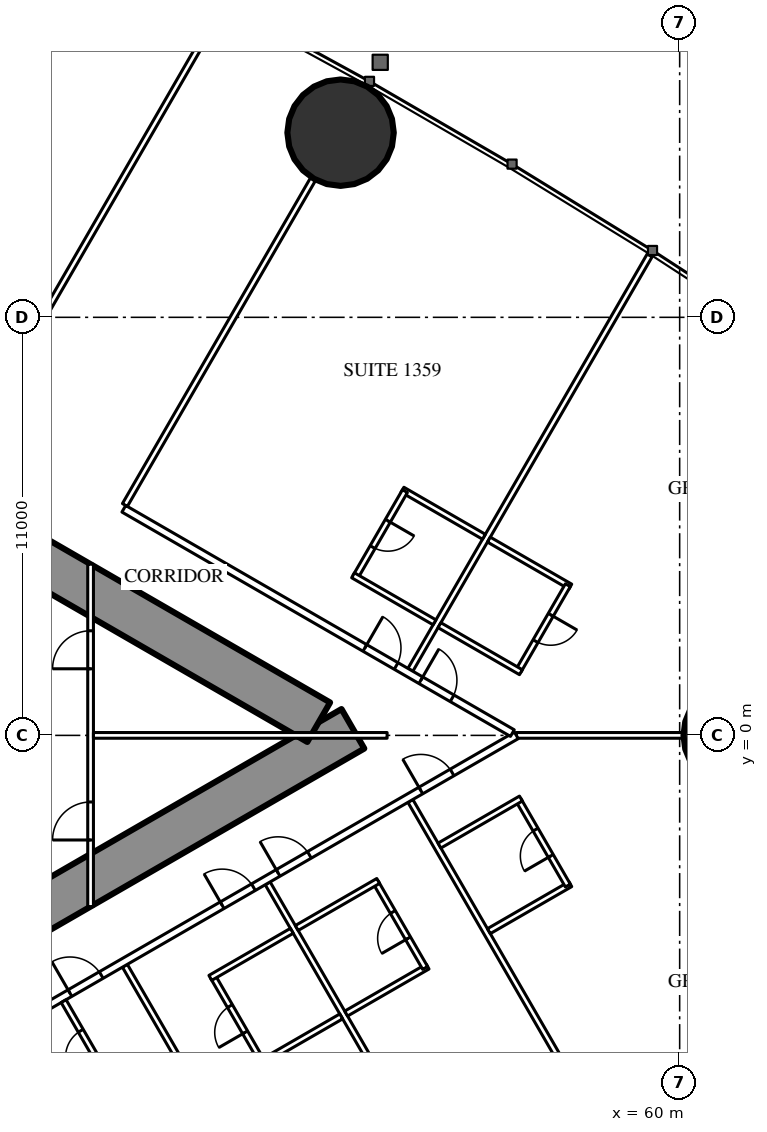
"""IFC4 building model, lengths in metres.
Left out: names, types, materials, properties, quantities, classifications, styles, units other than length and angle.
Written with IfcOpenShell. Run it as: python <this file> out.ifc"""

import sys

from ifc_helpers import new_model, si_unit, direction, frame, frame_2d, origin, origin_2d, place, context, subcontext, project, spatial, rectangle, hollow_circle, extrude, element, fill, save


model = new_model("IFC4")
c1 = context("Model", 3, precision=1e-05, world=origin(), true_north=direction((0.0, 1.0)))
c2 = subcontext(c1, "Body", "Model", "MODEL_VIEW")
j1 = project(units=[si_unit("LENGTHUNIT", "METRE"), si_unit("PLANEANGLEUNIT", "RADIAN")], contexts=[c1])
p1 = place(None, origin())
s1 = spatial("IfcSite", under=j1, at=p1, CompositionType="ELEMENT")
p2 = place(p1, origin())
s2 = spatial("IfcBuilding", under=s1, at=p2, CompositionType="ELEMENT")
p3 = place(p2, frame((0.0, 0.0, 53.0)))
s3 = spatial("IfcBuildingStorey", under=s2, at=p3, CompositionType="ELEMENT", Elevation=53.0)
p4 = place(p3, frame((51.078, 15.858, 0.0), z_axis=(0.0, 0.0, 1.0), x_axis=(1.0, 0.0, 0.0)))
e1 = element("IfcColumn", 1, at=p4, inside=s3, PredefinedType="COLUMN", context=c2, shape_type="SweptSolid", body=[
    extrude(hollow_circle(Radius=1.4, WallThickness=0.12, at=origin_2d()), origin(), (0.0, 0.0, 1.0), 3.5),
])
p5 = place(p3, frame((61.5, 0.0, 0.0), z_axis=(0.0, 0.0, 1.0), x_axis=(1.0, 0.0, 0.0)))
e2 = element("IfcColumn", 2, at=p5, inside=s3, PredefinedType="COLUMN", context=c2, shape_type="SweptSolid", body=[
    extrude(hollow_circle(Radius=1.4, WallThickness=0.1, at=origin_2d()), origin(), (0.0, 0.0, 1.0), 3.5),
])
p6 = place(p3, frame((27.2, -13.8, 0.0), z_axis=(0.0, 0.0, 1.0), x_axis=(0.866027159892, 0.499996958321, 0.0)))
e3 = element("IfcWall", 3, at=p6, inside=s3, PredefinedType="SHEAR", context=c2, shape_type="SweptSolid", body=[
    extrude(rectangle(XDim=27.947, YDim=1.2, at=frame_2d((13.973, 0.0))), origin(), (0.0, 0.0, 1.0), 3.5),
])
p7 = place(p6, frame((4.6, 0.0, 0.0)))
e4 = element("IfcOpeningElement", 4, at=p7, cuts=e3, PredefinedType="OPENING", context=c2, shape_type="SweptSolid", body=[
    extrude(rectangle(XDim=1.0, YDim=2.2, at=frame_2d((0.5, 1.1))), frame((0.0, 0.61, 0.0), z_axis=(0.0, -1.0, 0.0), x_axis=(1.0, 0.0, 0.0)), (0.0, 0.0, 1.0), 1.22),
])
p8 = place(p6, frame((13.395, 0.0, 0.0)))
e5 = element("IfcOpeningElement", 5, at=p8, cuts=e3, PredefinedType="OPENING", context=c2, shape_type="SweptSolid", body=[
    extrude(rectangle(XDim=1.8, YDim=2.2, at=frame_2d((0.9, 1.1))), frame((0.0, 0.61, 0.0), z_axis=(0.0, -1.0, 0.0), x_axis=(1.0, 0.0, 0.0)), (0.0, 0.0, 1.0), 1.22),
])
p9 = place(p3, frame((27.2, 13.8, 0.0), z_axis=(0.0, 0.0, 1.0), x_axis=(0.866024515034, -0.500001539357, 0.0)))
e6 = element("IfcWall", 6, at=p9, inside=s3, PredefinedType="SHEAR", context=c2, shape_type="SweptSolid", body=[
    extrude(rectangle(XDim=26.907, YDim=1.2, at=frame_2d((13.454, 0.0))), origin(), (0.0, 0.0, 1.0), 3.5),
])
p10 = place(p9, frame((4.6, 0.0, 0.0)))
e7 = element("IfcOpeningElement", 7, at=p10, cuts=e6, PredefinedType="OPENING", context=c2, shape_type="SweptSolid", body=[
    extrude(rectangle(XDim=1.0, YDim=2.2, at=frame_2d((0.5, 1.1))), frame((0.0, 0.61, 0.0), z_axis=(0.0, -1.0, 0.0), x_axis=(1.0, 0.0, 0.0)), (0.0, 0.0, 1.0), 1.22),
])
p11 = place(p9, frame((13.395, 0.0, 0.0)))
e8 = element("IfcOpeningElement", 8, at=p11, cuts=e6, PredefinedType="OPENING", context=c2, shape_type="SweptSolid", body=[
    extrude(rectangle(XDim=1.8, YDim=2.2, at=frame_2d((0.9, 1.1))), frame((0.0, 0.61, 0.0), z_axis=(0.0, -1.0, 0.0), x_axis=(1.0, 0.0, 0.0)), (0.0, 0.0, 1.0), 1.22),
])
p12 = place(p3, frame((41.647, -8.23, 0.0), z_axis=(0.0, 0.0, 1.0), x_axis=(0.49998590462, -0.866033541603, 0.0)))
e9 = element("IfcWall", 9, at=p12, inside=s3, PredefinedType="PARTITIONING", context=c2, shape_type="SweptSolid", body=[
    extrude(rectangle(XDim=12.621, YDim=0.15, at=frame_2d((6.311, 0.0))), origin(), (0.0, 0.0, 1.0), 3.25),
])
p13 = place(p3, frame((45.403, -6.062, 0.0), z_axis=(0.0, 0.0, 1.0), x_axis=(0.500007077968, -0.866021317279, 0.0)))
e10 = element("IfcWall", 10, at=p13, inside=s3, PredefinedType="PARTITIONING", context=c2, shape_type="SweptSolid", body=[
    extrude(rectangle(XDim=12.721, YDim=0.15, at=frame_2d((6.361, 0.0))), origin(), (0.0, 0.0, 1.0), 3.25),
])
p14 = place(p3, frame((49.159, -3.893, 0.0), z_axis=(0.0, 0.0, 1.0), x_axis=(0.499998773722, -0.866026111775, 0.0)))
e11 = element("IfcWall", 11, at=p14, inside=s3, PredefinedType="PARTITIONING", context=c2, shape_type="SweptSolid", body=[
    extrude(rectangle(XDim=9.892, YDim=0.15, at=frame_2d((4.946, 0.0))), origin(), (0.0, 0.0, 1.0), 2.25),
])
p15 = place(p3, frame((52.915, -1.725, 0.0), z_axis=(0.0, 0.0, 1.0), x_axis=(0.499997163113, -0.866027041656, 0.0)))
e12 = element("IfcWall", 12, at=p15, inside=s3, PredefinedType="PARTITIONING", context=c2, shape_type="SweptSolid", body=[
    extrude(rectangle(XDim=12.591, YDim=0.15, at=frame_2d((6.295, 0.0))), origin(), (0.0, 0.0, 1.0), 3.25),
])
p16 = place(p3, frame((41.647, 8.23, 0.0), z_axis=(0.0, 0.0, 1.0), x_axis=(0.49998590462, 0.866033541603, 0.0)))
e13 = element("IfcWall", 13, at=p16, inside=s3, PredefinedType="PARTITIONING", context=c2, shape_type="SweptSolid", body=[
    extrude(rectangle(XDim=12.621, YDim=0.15, at=frame_2d((6.311, 0.0))), origin(), (0.0, 0.0, 1.0), 3.25),
])
p17 = place(p3, frame((45.403, 6.062, 0.0), z_axis=(0.0, 0.0, 1.0), x_axis=(0.500013434677, 0.866017647131, 0.0)))
e14 = element("IfcWall", 14, at=p17, inside=s3, PredefinedType="PARTITIONING", context=c2, shape_type="SweptSolid", body=[
    extrude(rectangle(XDim=9.902, YDim=0.15, at=frame_2d((4.951, 0.0))), origin(), (0.0, 0.0, 1.0), 2.25),
])
p18 = place(p3, frame((52.915, 1.725, 0.0), z_axis=(0.0, 0.0, 1.0), x_axis=(0.499997163113, 0.866027041656, 0.0)))
e15 = element("IfcWall", 15, at=p18, inside=s3, PredefinedType="PARTITIONING", context=c2, shape_type="SweptSolid", body=[
    extrude(rectangle(XDim=12.591, YDim=0.15, at=frame_2d((6.295, 0.0))), origin(), (0.0, 0.0, 1.0), 3.25),
])
p19 = place(p3, frame((55.702, 0.0, 0.0), z_axis=(0.0, 0.0, 1.0), x_axis=(1.0, 0.0, 0.0)))
e16 = element("IfcWall", 16, at=p19, inside=s3, PredefinedType="PARTITIONING", context=c2, shape_type="SweptSolid", body=[
    extrude(rectangle(XDim=16.117, YDim=0.15, at=frame_2d((8.059, 0.0))), origin(), (0.0, 0.0, 1.0), 2.25),
])
p20 = place(p3, frame((37.96, -10.243, 0.0), z_axis=(0.0, 0.0, 1.0), x_axis=(0.866026429433, 0.499998223521, 0.0)))
e17 = element("IfcWall", 17, at=p20, inside=s3, PredefinedType="PARTITIONING", context=c2, shape_type="SweptSolid", body=[
    extrude(rectangle(XDim=20.487, YDim=0.2, at=frame_2d((10.243, 0.0))), origin(), (0.0, 0.0, 1.0), 3.25),
])
p21 = place(p20, frame((6.925, 0.0, 0.0)))
e18 = element("IfcOpeningElement", 18, at=p21, cuts=e17, PredefinedType="OPENING", context=c2, shape_type="SweptSolid", body=[
    extrude(rectangle(XDim=0.95, YDim=2.2, at=frame_2d((0.475, 1.1))), frame((0.0, 0.11, 0.0), z_axis=(0.0, -1.0, 0.0), x_axis=(1.0, 0.0, 0.0)), (0.0, 0.0, 1.0), 0.22),
])
p22 = place(p20, frame((11.549, 0.0, 0.0)))
e19 = element("IfcOpeningElement", 19, at=p22, cuts=e17, PredefinedType="OPENING", context=c2, shape_type="SweptSolid", body=[
    extrude(rectangle(XDim=0.95, YDim=2.2, at=frame_2d((0.475, 1.1))), frame((0.0, 0.11, 0.0), z_axis=(0.0, -1.0, 0.0), x_axis=(1.0, 0.0, 0.0)), (0.0, 0.0, 1.0), 0.22),
])
p23 = place(p20, frame((13.249, 0.0, 0.0)))
e20 = element("IfcOpeningElement", 20, at=p23, cuts=e17, PredefinedType="OPENING", context=c2, shape_type="SweptSolid", body=[
    extrude(rectangle(XDim=0.95, YDim=2.2, at=frame_2d((0.475, 1.1))), frame((0.0, 0.11, 0.0), z_axis=(0.0, -1.0, 0.0), x_axis=(1.0, 0.0, 0.0)), (0.0, 0.0, 1.0), 0.22),
])
p24 = place(p20, frame((17.585, 0.0, 0.0)))
e21 = element("IfcOpeningElement", 21, at=p24, cuts=e17, PredefinedType="OPENING", context=c2, shape_type="SweptSolid", body=[
    extrude(rectangle(XDim=0.95, YDim=2.2, at=frame_2d((0.475, 1.1))), frame((0.0, 0.11, 0.0), z_axis=(0.0, -1.0, 0.0), x_axis=(1.0, 0.0, 0.0)), (0.0, 0.0, 1.0), 0.22),
])
p25 = place(p20, frame((0.6, 0.0, 0.0)))
e22 = element("IfcOpeningElement", 22, at=p25, cuts=e17, PredefinedType="OPENING", context=c2, shape_type="SweptSolid", body=[
    extrude(rectangle(XDim=0.95, YDim=2.2, at=frame_2d((0.475, 1.1))), frame((0.0, 0.11, 0.0), z_axis=(0.0, -1.0, 0.0), x_axis=(1.0, 0.0, 0.0)), (0.0, 0.0, 1.0), 0.22),
])
p26 = place(p3, frame((45.375, 5.963, 0.0), z_axis=(0.0, 0.0, 1.0), x_axis=(0.86603164725, -0.499989185844, 0.0)))
e23 = element("IfcWall", 23, at=p26, inside=s3, PredefinedType="PARTITIONING", context=c2, shape_type="SweptSolid", body=[
    extrude(rectangle(XDim=11.805, YDim=0.2, at=frame_2d((5.903, 0.0))), origin(), (0.0, 0.0, 1.0), 3.25),
])
p27 = place(p26, frame((9.024, 0.0, 0.0)))
e24 = element("IfcOpeningElement", 24, at=p27, cuts=e23, PredefinedType="OPENING", context=c2, shape_type="SweptSolid", body=[
    extrude(rectangle(XDim=0.95, YDim=2.2, at=frame_2d((0.475, 1.1))), frame((0.0, 0.11, 0.0), z_axis=(0.0, -1.0, 0.0), x_axis=(1.0, 0.0, 0.0)), (0.0, 0.0, 1.0), 0.22),
])
p28 = place(p26, frame((7.324, 0.0, 0.0)))
e25 = element("IfcOpeningElement", 25, at=p28, cuts=e23, PredefinedType="OPENING", context=c2, shape_type="SweptSolid", body=[
    extrude(rectangle(XDim=0.95, YDim=2.2, at=frame_2d((0.475, 1.1))), frame((0.0, 0.11, 0.0), z_axis=(0.0, -1.0, 0.0), x_axis=(1.0, 0.0, 0.0)), (0.0, 0.0, 1.0), 0.22),
])
p29 = place(p3, frame((43.791, -6.993, 0.0), z_axis=(0.0, 0.0, 1.0), x_axis=(0.500047596559, -0.865997922154, 0.0)))
e26 = element("IfcWall", 26, at=p29, inside=s3, PredefinedType="PARTITIONING", context=c2, shape_type="SweptSolid", body=[
    extrude(rectangle(XDim=2.6, YDim=0.15, at=frame_2d((1.3, 0.0))), origin(), (0.0, 0.0, 1.0), 3.25),
])
p30 = place(p29, frame((0.9, 0.0, 0.0)))
e27 = element("IfcOpeningElement", 27, at=p30, cuts=e26, PredefinedType="OPENING", context=c2, shape_type="SweptSolid", body=[
    extrude(rectangle(XDim=0.8, YDim=2.2, at=frame_2d((0.4, 1.1))), frame((0.0, 0.085, 0.0), z_axis=(0.0, -1.0, 0.0), x_axis=(1.0, 0.0, 0.0)), (0.0, 0.0, 1.0), 0.17),
])
p31 = place(p3, frame((48.951, -8.632, 0.0), z_axis=(0.0, 0.0, 1.0), x_axis=(0.866006523861, 0.500032699561, 0.0)))
e28 = element("IfcWall", 28, at=p31, inside=s3, PredefinedType="PARTITIONING", context=c2, shape_type="SweptSolid", body=[
    extrude(rectangle(XDim=2.475, YDim=0.15, at=frame_2d((1.237, 0.0))), origin(), (0.0, 0.0, 1.0), 3.25),
])
p32 = place(p3, frame((47.716, -6.343, 0.0), z_axis=(0.0, 0.0, 1.0), x_axis=(0.500006934395, -0.866021400173, 0.0)))
e29 = element("IfcWall", 29, at=p32, inside=s3, PredefinedType="PARTITIONING", context=c2, shape_type="SweptSolid", body=[
    extrude(rectangle(XDim=2.6, YDim=0.15, at=frame_2d((1.3, 0.0))), origin(), (0.0, 0.0, 1.0), 3.25),
])
p33 = place(p32, frame((0.9, 0.0, 0.0)))
e30 = element("IfcOpeningElement", 30, at=p33, cuts=e29, PredefinedType="OPENING", context=c2, shape_type="SweptSolid", body=[
    extrude(rectangle(XDim=0.8, YDim=2.2, at=frame_2d((0.4, 1.1))), frame((0.0, 0.085, 0.0), z_axis=(0.0, -1.0, 0.0), x_axis=(1.0, 0.0, 0.0)), (0.0, 0.0, 1.0), 0.17),
])
for number, where, z_axis, x_axis in (
    (31, (47.651, -6.38, 0.0), (0.0, 0.0, 1.0), (0.866, 0.5, 0.0)),
    (32, (51.224, -7.32, 0.0), (0.0, 0.0, 1.0), (0.866, 0.5, 0.0)),
):
    element("IfcWall", number, at=place(p3, frame(where, z_axis=z_axis, x_axis=x_axis)), inside=s3, PredefinedType="PARTITIONING", context=c2, shape_type="SweptSolid", body=[
        extrude(rectangle(XDim=2.475, YDim=0.15, at=frame_2d((1.238, 0.0))), origin(), (0.0, 0.0, 1.0), 3.25),
    ])
p34 = place(p3, frame((52.003, -3.868, 0.0), z_axis=(0.0, 0.0, 1.0), x_axis=(0.500047596559, -0.865997922154, 0.0)))
e33 = element("IfcWall", 33, at=p34, inside=s3, PredefinedType="PARTITIONING", context=c2, shape_type="SweptSolid", body=[
    extrude(rectangle(XDim=2.6, YDim=0.15, at=frame_2d((1.3, 0.0))), origin(), (0.0, 0.0, 1.0), 3.25),
])
p35 = place(p34, frame((0.9, 0.0, 0.0)))
e34 = element("IfcOpeningElement", 34, at=p35, cuts=e33, PredefinedType="OPENING", context=c2, shape_type="SweptSolid", body=[
    extrude(rectangle(XDim=0.8, YDim=2.2, at=frame_2d((0.4, 1.1))), frame((0.0, 0.085, 0.0), z_axis=(0.0, -1.0, 0.0), x_axis=(1.0, 0.0, 0.0)), (0.0, 0.0, 1.0), 0.17),
])
for number, where, z_axis, x_axis in (
    (35, (49.925, -5.068, 0.0), (0.0, 0.0, 1.0), (0.866, 0.5, 0.0)),
    (36, (54.98, -5.151, 0.0), (0.0, 0.0, 1.0), (0.866, 0.5, 0.0)),
):
    element("IfcWall", number, at=place(p3, frame(where, z_axis=z_axis, x_axis=x_axis)), inside=s3, PredefinedType="PARTITIONING", context=c2, shape_type="SweptSolid", body=[
        extrude(rectangle(XDim=2.475, YDim=0.15, at=frame_2d((1.237, 0.0))), origin(), (0.0, 0.0, 1.0), 3.25),
    ])
p36 = place(p3, frame((55.758, -1.7, 0.0), z_axis=(0.0, 0.0, 1.0), x_axis=(0.500006934395, -0.866021400173, 0.0)))
e37 = element("IfcWall", 37, at=p36, inside=s3, PredefinedType="PARTITIONING", context=c2, shape_type="SweptSolid", body=[
    extrude(rectangle(XDim=2.6, YDim=0.15, at=frame_2d((1.3, 0.0))), origin(), (0.0, 0.0, 1.0), 3.25),
])
p37 = place(p36, frame((0.9, 0.0, 0.0)))
e38 = element("IfcOpeningElement", 38, at=p37, cuts=e37, PredefinedType="OPENING", context=c2, shape_type="SweptSolid", body=[
    extrude(rectangle(XDim=0.8, YDim=2.2, at=frame_2d((0.4, 1.1))), frame((0.0, 0.085, 0.0), z_axis=(0.0, -1.0, 0.0), x_axis=(1.0, 0.0, 0.0)), (0.0, 0.0, 1.0), 0.17),
])
for number, where, z_axis, x_axis in (
    (39, (53.68, -2.9, 0.0), (0.0, 0.0, 1.0), (0.866, 0.5, 0.0)),
    (40, (54.98, 5.151, 0.0), (0.0, 0.0, 1.0), (0.866, -0.5, 0.0)),
):
    element("IfcWall", number, at=place(p3, frame(where, z_axis=z_axis, x_axis=x_axis)), inside=s3, PredefinedType="PARTITIONING", context=c2, shape_type="SweptSolid", body=[
        extrude(rectangle(XDim=2.475, YDim=0.15, at=frame_2d((1.237, 0.0))), origin(), (0.0, 0.0, 1.0), 3.25),
    ])
p38 = place(p3, frame((55.758, 1.7, 0.0), z_axis=(0.0, 0.0, 1.0), x_axis=(0.500006934395, 0.866021400173, 0.0)))
e41 = element("IfcWall", 41, at=p38, inside=s3, PredefinedType="PARTITIONING", context=c2, shape_type="SweptSolid", body=[
    extrude(rectangle(XDim=2.6, YDim=0.15, at=frame_2d((1.3, 0.0))), origin(), (0.0, 0.0, 1.0), 3.25),
])
p39 = place(p38, frame((0.9, 0.0, 0.0)))
e42 = element("IfcOpeningElement", 42, at=p39, cuts=e41, PredefinedType="OPENING", context=c2, shape_type="SweptSolid", body=[
    extrude(rectangle(XDim=0.8, YDim=2.2, at=frame_2d((0.4, 1.1))), frame((0.0, 0.085, 0.0), z_axis=(0.0, -1.0, 0.0), x_axis=(1.0, 0.0, 0.0)), (0.0, 0.0, 1.0), 0.17),
])
for number, where, z_axis, x_axis in (
    (43, (53.68, 2.9, 0.0), (0.0, 0.0, 1.0), (0.866, -0.5, 0.0)),
    (44, (52.706, 6.464, 0.0), (0.0, 0.0, 1.0), (0.866, -0.5, 0.0)),
):
    element("IfcWall", number, at=place(p3, frame(where, z_axis=z_axis, x_axis=x_axis)), inside=s3, PredefinedType="PARTITIONING", context=c2, shape_type="SweptSolid", body=[
        extrude(rectangle(XDim=2.475, YDim=0.15, at=frame_2d((1.237, 0.0))), origin(), (0.0, 0.0, 1.0), 3.25),
    ])
p40 = place(p3, frame((51.471, 4.175, 0.0), z_axis=(0.0, 0.0, 1.0), x_axis=(0.500006934395, 0.866021400173, 0.0)))
e45 = element("IfcWall", 45, at=p40, inside=s3, PredefinedType="PARTITIONING", context=c2, shape_type="SweptSolid", body=[
    extrude(rectangle(XDim=2.6, YDim=0.15, at=frame_2d((1.3, 0.0))), origin(), (0.0, 0.0, 1.0), 3.25),
])
p41 = place(p40, frame((0.9, 0.0, 0.0)))
e46 = element("IfcOpeningElement", 46, at=p41, cuts=e45, PredefinedType="OPENING", context=c2, shape_type="SweptSolid", body=[
    extrude(rectangle(XDim=0.8, YDim=2.2, at=frame_2d((0.4, 1.1))), frame((0.0, 0.085, 0.0), z_axis=(0.0, -1.0, 0.0), x_axis=(1.0, 0.0, 0.0)), (0.0, 0.0, 1.0), 0.17),
])
p42 = place(p3, frame((51.406, 4.212, 0.0), z_axis=(0.0, 0.0, 1.0), x_axis=(0.866031185235, -0.4999899861, 0.0)))
e47 = element("IfcWall", 47, at=p42, inside=s3, PredefinedType="PARTITIONING", context=c2, shape_type="SweptSolid", body=[
    extrude(rectangle(XDim=2.475, YDim=0.15, at=frame_2d((1.238, 0.0))), origin(), (0.0, 0.0, 1.0), 3.25),
])
p43 = place(p3, frame((44.5, -4.505, 0.0), z_axis=(0.0, 0.0, 1.0), x_axis=(0.0, 1.0, 0.0)))
e48 = element("IfcWall", 48, at=p43, inside=s3, PredefinedType="PARTITIONING", context=c2, shape_type="SweptSolid", body=[
    extrude(rectangle(XDim=9.009, YDim=0.15, at=frame_2d((4.505, 0.0))), origin(), (0.0, 0.0, 1.0), 2.45),
])
p44 = place(p43, frame((1.752, 0.0, 0.0)))
e49 = element("IfcOpeningElement", 49, at=p44, cuts=e48, PredefinedType="OPENING", context=c2, shape_type="SweptSolid", body=[
    extrude(rectangle(XDim=1.0, YDim=2.2, at=frame_2d((0.5, 1.1))), frame((0.0, 0.085, 0.0), z_axis=(0.0, -1.0, 0.0), x_axis=(1.0, 0.0, 0.0)), (0.0, 0.0, 1.0), 0.17),
])
p45 = place(p43, frame((6.257, 0.0, 0.0)))
e50 = element("IfcOpeningElement", 50, at=p45, cuts=e48, PredefinedType="OPENING", context=c2, shape_type="SweptSolid", body=[
    extrude(rectangle(XDim=1.0, YDim=2.2, at=frame_2d((0.5, 1.1))), frame((0.0, 0.085, 0.0), z_axis=(0.0, -1.0, 0.0), x_axis=(1.0, 0.0, 0.0)), (0.0, 0.0, 1.0), 0.17),
])
p46 = place(p3, frame((44.575, 0.0, 0.0), z_axis=(0.0, 0.0, 1.0), x_axis=(1.0, 0.0, 0.0)))
e51 = element("IfcWall", 51, at=p46, inside=s3, PredefinedType="PARTITIONING", context=c2, shape_type="SweptSolid", body=[
    extrude(rectangle(XDim=7.727, YDim=0.15, at=frame_2d((3.864, 0.0))), origin(), (0.0, 0.0, 1.0), 2.25),
])
p47 = place(p30, origin())
e52 = element("IfcDoor", 52, at=p47, inside=s3, OperationType="SINGLE_SWING_RIGHT", PredefinedType="DOOR", context=c2, shape_type="SweptSolid", body=[
    extrude(rectangle(XDim=0.8, YDim=2.2, at=frame_2d((0.4, 1.1))), frame((0.0, 0.025, 0.0), z_axis=(0.0, -1.0, 0.0), x_axis=(1.0, 0.0, 0.0)), (0.0, 0.0, 1.0), 0.05),
])
fill(e27, e52)
p48 = place(p21, origin())
e53 = element("IfcDoor", 53, at=p48, inside=s3, OperationType="SINGLE_SWING_LEFT", PredefinedType="DOOR", context=c2, shape_type="SweptSolid", body=[
    extrude(rectangle(XDim=0.95, YDim=2.2, at=frame_2d((0.475, 1.1))), frame((0.0, 0.025, 0.0), z_axis=(0.0, -1.0, 0.0), x_axis=(1.0, 0.0, 0.0)), (0.0, 0.0, 1.0), 0.05),
])
fill(e18, e53)
p49 = place(p33, origin())
e54 = element("IfcDoor", 54, at=p49, inside=s3, OperationType="SINGLE_SWING_RIGHT", PredefinedType="DOOR", context=c2, shape_type="SweptSolid", body=[
    extrude(rectangle(XDim=0.8, YDim=2.2, at=frame_2d((0.4, 1.1))), frame((0.0, 0.025, 0.0), z_axis=(0.0, -1.0, 0.0), x_axis=(1.0, 0.0, 0.0)), (0.0, 0.0, 1.0), 0.05),
])
fill(e30, e54)
p50 = place(p22, origin())
e55 = element("IfcDoor", 55, at=p50, inside=s3, OperationType="SINGLE_SWING_LEFT", PredefinedType="DOOR", context=c2, shape_type="SweptSolid", body=[
    extrude(rectangle(XDim=0.95, YDim=2.2, at=frame_2d((0.475, 1.1))), frame((0.0, 0.025, 0.0), z_axis=(0.0, -1.0, 0.0), x_axis=(1.0, 0.0, 0.0)), (0.0, 0.0, 1.0), 0.05),
])
fill(e19, e55)
p51 = place(p35, origin())
e56 = element("IfcDoor", 56, at=p51, inside=s3, OperationType="SINGLE_SWING_RIGHT", PredefinedType="DOOR", context=c2, shape_type="SweptSolid", body=[
    extrude(rectangle(XDim=0.8, YDim=2.2, at=frame_2d((0.4, 1.1))), frame((0.0, 0.025, 0.0), z_axis=(0.0, -1.0, 0.0), x_axis=(1.0, 0.0, 0.0)), (0.0, 0.0, 1.0), 0.05),
])
fill(e34, e56)
p52 = place(p23, origin())
e57 = element("IfcDoor", 57, at=p52, inside=s3, OperationType="SINGLE_SWING_LEFT", PredefinedType="DOOR", context=c2, shape_type="SweptSolid", body=[
    extrude(rectangle(XDim=0.95, YDim=2.2, at=frame_2d((0.475, 1.1))), frame((0.0, 0.025, 0.0), z_axis=(0.0, -1.0, 0.0), x_axis=(1.0, 0.0, 0.0)), (0.0, 0.0, 1.0), 0.05),
])
fill(e20, e57)
p53 = place(p37, origin())
e58 = element("IfcDoor", 58, at=p53, inside=s3, OperationType="SINGLE_SWING_RIGHT", PredefinedType="DOOR", context=c2, shape_type="SweptSolid", body=[
    extrude(rectangle(XDim=0.8, YDim=2.2, at=frame_2d((0.4, 1.1))), frame((0.0, 0.025, 0.0), z_axis=(0.0, -1.0, 0.0), x_axis=(1.0, 0.0, 0.0)), (0.0, 0.0, 1.0), 0.05),
])
fill(e38, e58)
p54 = place(p24, origin())
e59 = element("IfcDoor", 59, at=p54, inside=s3, OperationType="SINGLE_SWING_LEFT", PredefinedType="DOOR", context=c2, shape_type="SweptSolid", body=[
    extrude(rectangle(XDim=0.95, YDim=2.2, at=frame_2d((0.475, 1.1))), frame((0.0, 0.025, 0.0), z_axis=(0.0, -1.0, 0.0), x_axis=(1.0, 0.0, 0.0)), (0.0, 0.0, 1.0), 0.05),
])
fill(e21, e59)
p55 = place(p39, origin())
e60 = element("IfcDoor", 60, at=p55, inside=s3, OperationType="SINGLE_SWING_RIGHT", PredefinedType="DOOR", context=c2, shape_type="SweptSolid", body=[
    extrude(rectangle(XDim=0.8, YDim=2.2, at=frame_2d((0.4, 1.1))), frame((0.0, 0.025, 0.0), z_axis=(0.0, -1.0, 0.0), x_axis=(1.0, 0.0, 0.0)), (0.0, 0.0, 1.0), 0.05),
])
fill(e42, e60)
p56 = place(p27, origin())
e61 = element("IfcDoor", 61, at=p56, inside=s3, OperationType="SINGLE_SWING_LEFT", PredefinedType="DOOR", context=c2, shape_type="SweptSolid", body=[
    extrude(rectangle(XDim=0.95, YDim=2.2, at=frame_2d((0.475, 1.1))), frame((0.0, 0.025, 0.0), z_axis=(0.0, -1.0, 0.0), x_axis=(1.0, 0.0, 0.0)), (0.0, 0.0, 1.0), 0.05),
])
fill(e24, e61)
p57 = place(p41, origin())
e62 = element("IfcDoor", 62, at=p57, inside=s3, OperationType="SINGLE_SWING_RIGHT", PredefinedType="DOOR", context=c2, shape_type="SweptSolid", body=[
    extrude(rectangle(XDim=0.8, YDim=2.2, at=frame_2d((0.4, 1.1))), frame((0.0, 0.025, 0.0), z_axis=(0.0, -1.0, 0.0), x_axis=(1.0, 0.0, 0.0)), (0.0, 0.0, 1.0), 0.05),
])
fill(e46, e62)
p58 = place(p28, origin())
e63 = element("IfcDoor", 63, at=p58, inside=s3, OperationType="SINGLE_SWING_LEFT", PredefinedType="DOOR", context=c2, shape_type="SweptSolid", body=[
    extrude(rectangle(XDim=0.95, YDim=2.2, at=frame_2d((0.475, 1.1))), frame((0.0, 0.025, 0.0), z_axis=(0.0, -1.0, 0.0), x_axis=(1.0, 0.0, 0.0)), (0.0, 0.0, 1.0), 0.05),
])
fill(e25, e63)
p59 = place(p44, origin())
e64 = element("IfcDoor", 64, at=p59, inside=s3, OperationType="SINGLE_SWING_LEFT", PredefinedType="DOOR", context=c2, shape_type="SweptSolid", body=[
    extrude(rectangle(XDim=1.0, YDim=2.2, at=frame_2d((0.5, 1.1))), frame((0.0, 0.025, 0.0), z_axis=(0.0, -1.0, 0.0), x_axis=(1.0, 0.0, 0.0)), (0.0, 0.0, 1.0), 0.05),
])
fill(e49, e64)
p60 = place(p45, origin())
e65 = element("IfcDoor", 65, at=p60, inside=s3, OperationType="SINGLE_SWING_LEFT", PredefinedType="DOOR", context=c2, shape_type="SweptSolid", body=[
    extrude(rectangle(XDim=1.0, YDim=2.2, at=frame_2d((0.5, 1.1))), frame((0.0, 0.025, 0.0), z_axis=(0.0, -1.0, 0.0), x_axis=(1.0, 0.0, 0.0)), (0.0, 0.0, 1.0), 0.05),
])
fill(e50, e65)
save(model, sys.argv[1])
